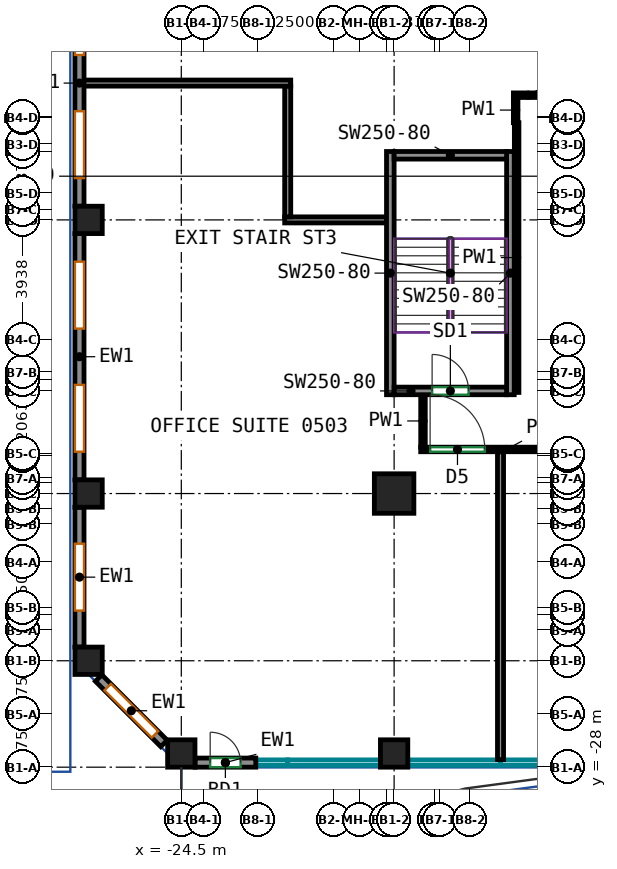
"""IFC4 building model, lengths in metres.
Left out: names, types, materials, properties, quantities, classifications, styles, units other than length and angle.
Written with IfcOpenShell. Run it as: python <this file> out.ifc"""

import sys

from ifc_helpers import new_model, si_unit, direction, frame, frame_2d, origin, origin_2d, place, context, subcontext, project, spatial, rectangle, extrude, source, transform, mapped, element, fill, save


model = new_model("IFC4")
c1 = context("Model", 3, precision=1e-05, world=origin(), true_north=direction((0.0, 1.0)))
c2 = subcontext(c1, "Body", "Model", "MODEL_VIEW")
j1 = project(units=[si_unit("LENGTHUNIT", "METRE"), si_unit("PLANEANGLEUNIT", "RADIAN")], contexts=[c1])
p1 = place(None, origin())
s1 = spatial("IfcSite", under=j1, at=p1, CompositionType="ELEMENT")
p2 = place(p1, origin())
s2 = spatial("IfcBuilding", under=s1, at=p2, CompositionType="ELEMENT")
p3 = place(p2, frame((0.0, 0.0, 27.0)))
s3 = spatial("IfcBuildingStorey", under=s2, at=p3, CompositionType="ELEMENT", Elevation=27.0)
m1 = source(origin(), c2, "Body", "SweptSolid", [
    extrude(rectangle(XDim=0.9, YDim=0.9, at=origin_2d()), origin(), (0.0, 0.0, 1.0), 3.72),
])
for number, where, z_axis, x_axis in (
    (1, (-27.55, -24.5, 0.0), (0.0, 0.0, 1.0), (1.0, 0.0, 0.0)),
    (2, (-27.55, -19.0, 0.0), (0.0, 0.0, 1.0), (1.0, 0.0, 0.0)),
    (3, (-27.55, -10.0, 0.0), (0.0, 0.0, 1.0), (1.0, 0.0, 0.0)),
    (4, (-24.5, -27.55, 0.0), (0.0, 0.0, 1.0), (1.0, 0.0, 0.0)),
    (5, (-17.5, -27.55, 0.0), (0.0, 0.0, 1.0), (1.0, 0.0, 0.0)),
):
    element("IfcColumn", number, at=place(p3, frame(where, z_axis=z_axis, x_axis=x_axis)), inside=s3, PredefinedType="COLUMN", context=c2, shape_type="MappedRepresentation", body=[
        mapped(m1, transform((0.0, 0.0, 0.0))),
    ])
m2 = source(origin(), c2, "Body", "SweptSolid", [
    extrude(rectangle(XDim=1.3, YDim=1.3, at=origin_2d()), origin(), (0.0, 0.0, 1.0), 3.72),
])
p4 = place(p3, frame((-17.5, -19.0, 0.0), z_axis=(0.0, 0.0, 1.0), x_axis=(1.0, 0.0, 0.0)))
e6 = element("IfcColumn", 6, at=p4, inside=s3, PredefinedType="COLUMN", context=c2, shape_type="MappedRepresentation", body=[
    mapped(m2, transform((0.0, 0.0, 0.0))),
])
m3 = source(origin(), c2, "Body", "SweptSolid", [
    extrude(rectangle(XDim=8.0, YDim=0.25, at=frame_2d((4.0, 0.0))), origin(), (0.0, 0.0, 1.0), 3.72),
])
for number, where, z_axis, x_axis in (
    (7, (-17.625, -15.75, 0.0), (0.0, 0.0, 1.0), (0.0, 1.0, 0.0)),
    (8, (-13.675, -15.75, 0.0), (0.0, 0.0, 1.0), (0.0, 1.0, 0.0)),
):
    element("IfcWall", number, at=place(p3, frame(where, z_axis=z_axis, x_axis=x_axis)), inside=s3, PredefinedType="SHEAR", context=c2, shape_type="MappedRepresentation", body=[
        mapped(m3, transform((0.0, 0.0, 0.0))),
    ])
m4 = source(origin(), c2, "Body", "SweptSolid", [
    extrude(rectangle(XDim=3.7, YDim=0.25, at=frame_2d((1.85, 0.0))), origin(), (0.0, 0.0, 1.0), 3.72),
])
p5 = place(p3, frame((-17.5, -15.625, 0.0), z_axis=(0.0, 0.0, 1.0), x_axis=(1.0, 0.0, 0.0)))
e9 = element("IfcWall", 9, at=p5, inside=s3, PredefinedType="SHEAR", context=c2, shape_type="MappedRepresentation", body=[
    mapped(m4, transform((0.0, 0.0, 0.0))),
])
p6 = place(p5, frame((1.25, 0.0, 0.0)))
e10 = element("IfcOpeningElement", 10, at=p6, cuts=e9, PredefinedType="OPENING", context=c2, shape_type="SweptSolid", body=[
    extrude(rectangle(XDim=1.2, YDim=2.1, at=frame_2d((0.6, 1.05))), frame((0.0, 0.135, 0.0), z_axis=(0.0, -1.0, 0.0), x_axis=(1.0, 0.0, 0.0)), (0.0, 0.0, 1.0), 0.27),
])
p7 = place(p3, frame((-17.5, -7.875, 0.0), z_axis=(0.0, 0.0, 1.0), x_axis=(1.0, 0.0, 0.0)))
e11 = element("IfcWall", 11, at=p7, inside=s3, PredefinedType="SHEAR", context=c2, shape_type="MappedRepresentation", body=[
    mapped(m4, transform((0.0, 0.0, 0.0))),
])
m5 = source(origin(), c2, "Body", "SweptSolid", [
    extrude(rectangle(XDim=2.0, YDim=0.3, at=frame_2d((1.0, 0.0))), origin(), (0.0, 0.0, 1.0), 3.72),
])
p8 = place(p3, frame((-24.05, -27.85, 0.0), z_axis=(0.0, 0.0, 1.0), x_axis=(1.0, 0.0, 0.0)))
e12 = element("IfcWall", 12, at=p8, inside=s3, PredefinedType="SOLIDWALL", context=c2, shape_type="MappedRepresentation", body=[
    mapped(m5, transform((0.0, 0.0, 0.0))),
])
p9 = place(p8, frame((0.5, 0.0, 0.0)))
e13 = element("IfcOpeningElement", 13, at=p9, cuts=e12, PredefinedType="OPENING", context=c2, shape_type="SweptSolid", body=[
    extrude(rectangle(XDim=1.0, YDim=2.1, at=frame_2d((0.5, 1.05))), frame((0.0, 0.16, 0.0), z_axis=(0.0, -1.0, 0.0), x_axis=(1.0, 0.0, 0.0)), (0.0, 0.0, 1.0), 0.32),
])
m6 = source(origin(), c2, "Body", "SweptSolid", [
    extrude(rectangle(XDim=8.1, YDim=0.3, at=frame_2d((4.05, 0.0))), origin(), (0.0, 0.0, 1.0), 3.72),
])
p10 = place(p3, frame((-27.85, -1.45, 0.0), z_axis=(0.0, 0.0, 1.0), x_axis=(0.0, -1.0, 0.0)))
e14 = element("IfcWall", 14, at=p10, inside=s3, PredefinedType="SOLIDWALL", context=c2, shape_type="MappedRepresentation", body=[
    mapped(m6, transform((0.0, 0.0, 0.0))),
])
p11 = place(p10, frame((0.925, 0.0, 0.7)))
e15 = element("IfcOpeningElement", 15, at=p11, cuts=e14, PredefinedType="OPENING", context=c2, shape_type="SweptSolid", body=[
    extrude(rectangle(XDim=2.2, YDim=2.25, at=frame_2d((1.1, 1.125))), frame((0.0, 0.16, 0.0), z_axis=(0.0, -1.0, 0.0), x_axis=(1.0, 0.0, 0.0)), (0.0, 0.0, 1.0), 0.32),
])
p12 = place(p10, frame((4.975, 0.0, 0.7)))
e16 = element("IfcOpeningElement", 16, at=p12, cuts=e14, PredefinedType="OPENING", context=c2, shape_type="SweptSolid", body=[
    extrude(rectangle(XDim=2.2, YDim=2.25, at=frame_2d((1.1, 1.125))), frame((0.0, 0.16, 0.0), z_axis=(0.0, -1.0, 0.0), x_axis=(1.0, 0.0, 0.0)), (0.0, 0.0, 1.0), 0.32),
])
p13 = place(p3, frame((-27.85, -10.45, 0.0), z_axis=(0.0, 0.0, 1.0), x_axis=(0.0, -1.0, 0.0)))
e17 = element("IfcWall", 17, at=p13, inside=s3, PredefinedType="SOLIDWALL", context=c2, shape_type="MappedRepresentation", body=[
    mapped(m6, transform((0.0, 0.0, 0.0))),
])
p14 = place(p13, frame((0.925, 0.0, 0.7)))
e18 = element("IfcOpeningElement", 18, at=p14, cuts=e17, PredefinedType="OPENING", context=c2, shape_type="SweptSolid", body=[
    extrude(rectangle(XDim=2.2, YDim=2.25, at=frame_2d((1.1, 1.125))), frame((0.0, 0.16, 0.0), z_axis=(0.0, -1.0, 0.0), x_axis=(1.0, 0.0, 0.0)), (0.0, 0.0, 1.0), 0.32),
])
p15 = place(p13, frame((4.975, 0.0, 0.7)))
e19 = element("IfcOpeningElement", 19, at=p15, cuts=e17, PredefinedType="OPENING", context=c2, shape_type="SweptSolid", body=[
    extrude(rectangle(XDim=2.2, YDim=2.25, at=frame_2d((1.1, 1.125))), frame((0.0, 0.16, 0.0), z_axis=(0.0, -1.0, 0.0), x_axis=(1.0, 0.0, 0.0)), (0.0, 0.0, 1.0), 0.32),
])
m7 = source(origin(), c2, "Body", "SweptSolid", [
    extrude(rectangle(XDim=4.6, YDim=0.3, at=frame_2d((2.3, 0.0))), origin(), (0.0, 0.0, 1.0), 3.72),
])
p16 = place(p3, frame((-27.85, -19.45, 0.0), z_axis=(0.0, 0.0, 1.0), x_axis=(0.0, -1.0, 0.0)))
e20 = element("IfcWall", 20, at=p16, inside=s3, PredefinedType="SOLIDWALL", context=c2, shape_type="MappedRepresentation", body=[
    mapped(m7, transform((0.0, 0.0, 0.0))),
])
p17 = place(p16, frame((1.2, 0.0, 0.7)))
e21 = element("IfcOpeningElement", 21, at=p17, cuts=e20, PredefinedType="OPENING", context=c2, shape_type="SweptSolid", body=[
    extrude(rectangle(XDim=2.2, YDim=2.25, at=frame_2d((1.1, 1.125))), frame((0.0, 0.16, 0.0), z_axis=(0.0, -1.0, 0.0), x_axis=(1.0, 0.0, 0.0)), (0.0, 0.0, 1.0), 0.32),
])
m8 = source(origin(), c2, "Body", "SweptSolid", [
    extrude(rectangle(XDim=3.041, YDim=0.3, at=frame_2d((1.521, 0.0))), origin(), (0.0, 0.0, 1.0), 3.72),
])
p18 = place(p3, frame((-27.219, -25.069, 0.0), z_axis=(0.0, 0.0, 1.0), x_axis=(0.707106781187, -0.707106781187, 0.0)))
e22 = element("IfcWall", 22, at=p18, inside=s3, PredefinedType="SOLIDWALL", context=c2, shape_type="MappedRepresentation", body=[
    mapped(m8, transform((0.0, 0.0, 0.0))),
])
p19 = place(p18, frame((0.42, 0.0, 0.7)))
e23 = element("IfcOpeningElement", 23, at=p19, cuts=e22, PredefinedType="OPENING", context=c2, shape_type="SweptSolid", body=[
    extrude(rectangle(XDim=2.2, YDim=2.25, at=frame_2d((1.1, 1.125))), frame((0.0, 0.16, 0.0), z_axis=(0.0, -1.0, 0.0), x_axis=(1.0, 0.0, 0.0)), (0.0, 0.0, 1.0), 0.32),
])
p20 = place(p3, frame((-12.598, -5.898, 0.0), z_axis=(0.0, 0.0, 1.0), x_axis=(-1.0, 0.0, 0.0)))
e24 = element("IfcWall", 24, at=p20, inside=s3, PredefinedType="PARTITIONING", context=c2, shape_type="SweptSolid", body=[
    extrude(rectangle(XDim=0.979, YDim=0.15, at=frame_2d((0.49, 0.0))), origin(), (0.0, 0.0, 1.0), 3.72),
])
p21 = place(p3, frame((-13.47, -6.802, 0.0), z_axis=(0.0, 0.0, 1.0), x_axis=(0.0, -1.0, 0.0)))
e25 = element("IfcWall", 25, at=p21, inside=s3, PredefinedType="PARTITIONING", context=c2, shape_type="SweptSolid", body=[
    extrude(rectangle(XDim=8.873, YDim=0.15, at=frame_2d((4.437, 0.0))), origin(), (0.0, 0.0, 1.0), 3.72),
])
p22 = place(p3, frame((-13.502, -5.973, 0.0), z_axis=(0.0, 0.0, 1.0), x_axis=(0.0, -1.0, 0.0)))
e26 = element("IfcWall", 26, at=p22, inside=s3, PredefinedType="PARTITIONING", context=c2, shape_type="SweptSolid", body=[
    extrude(rectangle(XDim=0.829, YDim=0.15, at=frame_2d((0.415, 0.0))), origin(), (0.0, 0.0, 1.0), 3.72),
])
p23 = place(p3, frame((-16.625, -17.55, 0.0), z_axis=(0.0, 0.0, 1.0), x_axis=(1.0, 0.0, 0.0)))
e27 = element("IfcWall", 27, at=p23, inside=s3, PredefinedType="PARTITIONING", context=c2, shape_type="SweptSolid", body=[
    extrude(rectangle(XDim=4.023, YDim=0.15, at=frame_2d((2.011, 0.0))), origin(), (0.0, 0.0, 1.0), 3.72),
])
p24 = place(p23, frame((0.309, 0.0, 0.0)))
e28 = element("IfcOpeningElement", 28, at=p24, cuts=e27, PredefinedType="OPENING", context=c2, shape_type="SweptSolid", body=[
    extrude(rectangle(XDim=1.8, YDim=2.1, at=frame_2d((0.9, 1.05))), frame((0.0, 0.085, 0.0), z_axis=(0.0, -1.0, 0.0), x_axis=(1.0, 0.0, 0.0)), (0.0, 0.0, 1.0), 0.17),
])
p25 = place(p3, frame((-16.55, -15.75, 0.0), z_axis=(0.0, 0.0, 1.0), x_axis=(0.0, -1.0, 0.0)))
e29 = element("IfcWall", 29, at=p25, inside=s3, PredefinedType="PARTITIONING", context=c2, shape_type="SweptSolid", body=[
    extrude(rectangle(XDim=1.725, YDim=0.15, at=frame_2d((0.863, 0.0))), origin(), (0.0, 0.0, 1.0), 3.72),
])
p26 = place(p3, frame((-21.1, -10.0, 0.0), z_axis=(0.0, 0.0, 1.0), x_axis=(1.0, 0.0, 0.0)))
e30 = element("IfcWall", 30, at=p26, inside=s3, PredefinedType="PARTITIONING", context=c2, shape_type="SweptSolid", body=[
    extrude(rectangle(XDim=3.35, YDim=0.2, at=frame_2d((1.675, 0.0))), origin(), (0.0, 0.0, 1.0), 3.72),
])
p27 = place(p3, frame((-21.0, -9.9, 0.0), z_axis=(0.0, 0.0, 1.0), x_axis=(0.0, 1.0, 0.0)))
e31 = element("IfcWall", 31, at=p27, inside=s3, PredefinedType="PARTITIONING", context=c2, shape_type="SweptSolid", body=[
    extrude(rectangle(XDim=4.3, YDim=0.2, at=frame_2d((2.15, 0.0))), origin(), (0.0, 0.0, 1.0), 3.72),
])
p28 = place(p3, frame((-27.75, -5.5, 0.0), z_axis=(0.0, 0.0, 1.0), x_axis=(1.0, 0.0, 0.0)))
e32 = element("IfcWall", 32, at=p28, inside=s3, PredefinedType="PARTITIONING", context=c2, shape_type="SweptSolid", body=[
    extrude(rectangle(XDim=6.85, YDim=0.2, at=frame_2d((3.425, 0.0))), origin(), (0.0, 0.0, 1.0), 3.72),
])
p29 = place(p3, frame((-14.0, -27.75, 0.0), z_axis=(0.0, 0.0, 1.0), x_axis=(0.0, 1.0, 0.0)))
e33 = element("IfcWall", 33, at=p29, inside=s3, PredefinedType="PARTITIONING", context=c2, shape_type="SweptSolid", body=[
    extrude(rectangle(XDim=10.124, YDim=0.2, at=frame_2d((5.062, 0.0))), origin(), (0.0, 0.0, 1.0), 3.72),
])
p30 = place(p9, origin())
e34 = element("IfcDoor", 34, at=p30, inside=s3, OperationType="SINGLE_SWING_LEFT", PredefinedType="DOOR", context=c2, shape_type="SweptSolid", body=[
    extrude(rectangle(XDim=1.0, YDim=2.1, at=frame_2d((0.5, 1.05))), frame((0.0, 0.025, 0.0), z_axis=(0.0, -1.0, 0.0), x_axis=(1.0, 0.0, 0.0)), (0.0, 0.0, 1.0), 0.05),
])
fill(e13, e34)
p31 = place(p11, origin())
e35 = element("IfcWindow", 35, at=p31, inside=s3, PartitioningType="SINGLE_PANEL", PredefinedType="WINDOW", context=c2, shape_type="SweptSolid", body=[
    extrude(rectangle(XDim=2.2, YDim=2.25, at=frame_2d((1.1, 1.125))), frame((0.0, 0.03, 0.0), z_axis=(0.0, -1.0, 0.0), x_axis=(1.0, 0.0, 0.0)), (0.0, 0.0, 1.0), 0.06),
])
fill(e15, e35)
p32 = place(p12, origin())
e36 = element("IfcWindow", 36, at=p32, inside=s3, PartitioningType="SINGLE_PANEL", PredefinedType="WINDOW", context=c2, shape_type="SweptSolid", body=[
    extrude(rectangle(XDim=2.2, YDim=2.25, at=frame_2d((1.1, 1.125))), frame((0.0, 0.03, 0.0), z_axis=(0.0, -1.0, 0.0), x_axis=(1.0, 0.0, 0.0)), (0.0, 0.0, 1.0), 0.06),
])
fill(e16, e36)
p33 = place(p14, origin())
e37 = element("IfcWindow", 37, at=p33, inside=s3, PartitioningType="SINGLE_PANEL", PredefinedType="WINDOW", context=c2, shape_type="SweptSolid", body=[
    extrude(rectangle(XDim=2.2, YDim=2.25, at=frame_2d((1.1, 1.125))), frame((0.0, 0.03, 0.0), z_axis=(0.0, -1.0, 0.0), x_axis=(1.0, 0.0, 0.0)), (0.0, 0.0, 1.0), 0.06),
])
fill(e18, e37)
p34 = place(p15, origin())
e38 = element("IfcWindow", 38, at=p34, inside=s3, PartitioningType="SINGLE_PANEL", PredefinedType="WINDOW", context=c2, shape_type="SweptSolid", body=[
    extrude(rectangle(XDim=2.2, YDim=2.25, at=frame_2d((1.1, 1.125))), frame((0.0, 0.03, 0.0), z_axis=(0.0, -1.0, 0.0), x_axis=(1.0, 0.0, 0.0)), (0.0, 0.0, 1.0), 0.06),
])
fill(e19, e38)
p35 = place(p17, origin())
e39 = element("IfcWindow", 39, at=p35, inside=s3, PartitioningType="SINGLE_PANEL", PredefinedType="WINDOW", context=c2, shape_type="SweptSolid", body=[
    extrude(rectangle(XDim=2.2, YDim=2.25, at=frame_2d((1.1, 1.125))), frame((0.0, 0.03, 0.0), z_axis=(0.0, -1.0, 0.0), x_axis=(1.0, 0.0, 0.0)), (0.0, 0.0, 1.0), 0.06),
])
fill(e21, e39)
p36 = place(p19, origin())
e40 = element("IfcWindow", 40, at=p36, inside=s3, PartitioningType="SINGLE_PANEL", PredefinedType="WINDOW", context=c2, shape_type="SweptSolid", body=[
    extrude(rectangle(XDim=2.2, YDim=2.25, at=frame_2d((1.1, 1.125))), frame((0.0, 0.03, 0.0), z_axis=(0.0, -1.0, 0.0), x_axis=(1.0, 0.0, 0.0)), (0.0, 0.0, 1.0), 0.06),
])
fill(e23, e40)
p37 = place(p6, origin())
e41 = element("IfcDoor", 41, at=p37, inside=s3, OperationType="DOUBLE_DOOR_SINGLE_SWING", PredefinedType="DOOR", context=c2, shape_type="SweptSolid", body=[
    extrude(rectangle(XDim=1.2, YDim=2.1, at=frame_2d((0.6, 1.05))), frame((0.0, 0.025, 0.0), z_axis=(0.0, -1.0, 0.0), x_axis=(1.0, 0.0, 0.0)), (0.0, 0.0, 1.0), 0.05),
])
fill(e10, e41)
p38 = place(p24, origin())
e42 = element("IfcDoor", 42, at=p38, inside=s3, OperationType="DOUBLE_DOOR_SINGLE_SWING", PredefinedType="DOOR", context=c2, shape_type="SweptSolid", body=[
    extrude(rectangle(XDim=1.8, YDim=2.1, at=frame_2d((0.9, 1.05))), frame((0.0, 0.025, 0.0), z_axis=(0.0, -1.0, 0.0), x_axis=(1.0, 0.0, 0.0)), (0.0, 0.0, 1.0), 0.05),
])
fill(e28, e42)
save(model, sys.argv[1])
